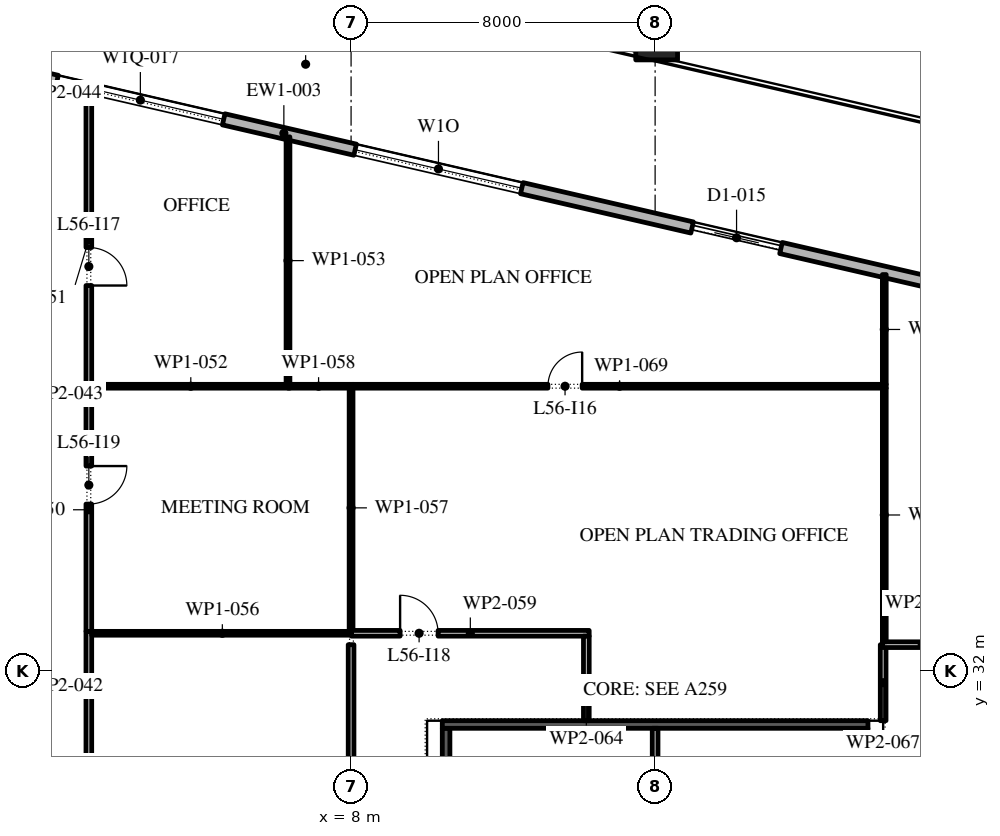
"""IFC4 building model, lengths in metres.
Left out: names, types, materials, properties, quantities, classifications, styles, units other than length and angle.
Written with IfcOpenShell. Run it as: python <this file> out.ifc"""

import sys

from ifc_helpers import new_model, si_unit, direction, frame, frame_2d, origin, origin_2d, place, context, subcontext, project, spatial, rectangle, extrude, element, fill, save


model = new_model("IFC4")
c1 = context("Model", 3, precision=1e-05, world=origin(), true_north=direction((0.0, 1.0)))
c2 = subcontext(c1, "Body", "Model", "MODEL_VIEW")
j1 = project(units=[si_unit("LENGTHUNIT", "METRE"), si_unit("PLANEANGLEUNIT", "RADIAN")], contexts=[c1])
p1 = place(None, origin())
s1 = spatial("IfcSite", under=j1, at=p1, CompositionType="ELEMENT")
p2 = place(p1, origin())
s2 = spatial("IfcBuilding", under=s1, at=p2, CompositionType="ELEMENT")
p3 = place(p2, frame((0.0, 0.0, 259.8)))
s3 = spatial("IfcBuildingStorey", under=s2, at=p3, CompositionType="ELEMENT", Elevation=259.8)
p4 = place(p3, frame((16.04, 48.637, 0.0), z_axis=(0.020377493232, 0.0882252832, 0.995892091129), x_axis=(-0.97434807649, 0.225046274885, 0.0)))
e1 = element("IfcColumn", 1, at=p4, inside=s3, PredefinedType="COLUMN", context=c2, shape_type="SweptSolid", body=[
    extrude(rectangle(XDim=1.1, YDim=1.1, at=origin_2d()), origin(), (0.0, 0.0, 1.0), 4.217),
])
p5 = place(p3, frame((21.359, -11.678, 0.0), z_axis=(0.0, 0.0, 1.0), x_axis=(0.224949198343, 0.974370493275, 0.0)))
e2 = element("IfcWall", 2, at=p5, inside=s3, PredefinedType="STANDARD", context=c2, shape_type="SweptSolid", body=[
    extrude(rectangle(XDim=49.5, YDim=0.3, at=frame_2d((24.75, 0.0))), origin(), (0.0, 0.0, 1.0), 4.0),
])
p6 = place(p5, frame((1.157, 0.0, 0.45)))
e3 = element("IfcOpeningElement", 3, at=p6, cuts=e2, PredefinedType="OPENING", context=c2, shape_type="SweptSolid", body=[
    extrude(rectangle(XDim=4.5, YDim=3.05, at=frame_2d((2.25, 1.525))), frame((0.0, 0.16, 0.0), z_axis=(0.0, -1.0, 0.0), x_axis=(1.0, 0.0, 0.0)), (0.0, 0.0, 1.0), 0.32),
])
p7 = place(p5, frame((8.121, 0.0, 0.45)))
e4 = element("IfcOpeningElement", 4, at=p7, cuts=e2, PredefinedType="OPENING", context=c2, shape_type="SweptSolid", body=[
    extrude(rectangle(XDim=4.5, YDim=3.05, at=frame_2d((2.25, 1.525))), frame((0.0, 0.16, 0.0), z_axis=(0.0, -1.0, 0.0), x_axis=(1.0, 0.0, 0.0)), (0.0, 0.0, 1.0), 0.32),
])
p8 = place(p5, frame((15.236, 0.0, 0.45)))
e5 = element("IfcOpeningElement", 5, at=p8, cuts=e2, PredefinedType="OPENING", context=c2, shape_type="SweptSolid", body=[
    extrude(rectangle(XDim=4.5, YDim=3.05, at=frame_2d((2.25, 1.525))), frame((0.0, 0.16, 0.0), z_axis=(0.0, -1.0, 0.0), x_axis=(1.0, 0.0, 0.0)), (0.0, 0.0, 1.0), 0.32),
])
p9 = place(p5, frame((22.35, 0.0, 0.45)))
e6 = element("IfcOpeningElement", 6, at=p9, cuts=e2, PredefinedType="OPENING", context=c2, shape_type="SweptSolid", body=[
    extrude(rectangle(XDim=4.5, YDim=3.05, at=frame_2d((2.25, 1.525))), frame((0.0, 0.16, 0.0), z_axis=(0.0, -1.0, 0.0), x_axis=(1.0, 0.0, 0.0)), (0.0, 0.0, 1.0), 0.32),
])
p10 = place(p5, frame((29.464, 0.0, 0.45)))
e7 = element("IfcOpeningElement", 7, at=p10, cuts=e2, PredefinedType="OPENING", context=c2, shape_type="SweptSolid", body=[
    extrude(rectangle(XDim=4.5, YDim=2.95, at=frame_2d((2.25, 1.475))), frame((0.0, 0.16, 0.0), z_axis=(0.0, -1.0, 0.0), x_axis=(1.0, 0.0, 0.0)), (0.0, 0.0, 1.0), 0.32),
])
p11 = place(p5, frame((37.628, 0.0, 0.0)))
e8 = element("IfcOpeningElement", 8, at=p11, cuts=e2, PredefinedType="OPENING", context=c2, shape_type="SweptSolid", body=[
    extrude(rectangle(XDim=2.4, YDim=3.325, at=frame_2d((1.2, 1.663))), frame((0.0, 0.16, 0.0), z_axis=(0.0, -1.0, 0.0), x_axis=(1.0, 0.0, 0.0)), (0.0, 0.0, 1.0), 0.32),
])
p12 = place(p5, frame((43.693, 0.0, 0.45)))
e9 = element("IfcOpeningElement", 9, at=p12, cuts=e2, PredefinedType="OPENING", context=c2, shape_type="SweptSolid", body=[
    extrude(rectangle(XDim=4.5, YDim=3.05, at=frame_2d((2.25, 1.525))), frame((0.0, 0.16, 0.0), z_axis=(0.0, -1.0, 0.0), x_axis=(1.0, 0.0, 0.0)), (0.0, 0.0, 1.0), 0.32),
])
p13 = place(p3, frame((29.616, 40.758, 0.0), z_axis=(0.0, 0.0, 1.0), x_axis=(-0.974370532314, 0.224949029246, 0.0)))
e10 = element("IfcWall", 10, at=p13, inside=s3, PredefinedType="STANDARD", context=c2, shape_type="SweptSolid", body=[
    extrude(rectangle(XDim=48.0, YDim=0.3, at=frame_2d((24.0, 0.0))), origin(), (0.0, 0.0, 1.0), 4.0),
])
p14 = place(p13, frame((1.625, 0.0, 0.45)))
e11 = element("IfcOpeningElement", 11, at=p14, cuts=e10, PredefinedType="OPENING", context=c2, shape_type="SweptSolid", body=[
    extrude(rectangle(XDim=4.5, YDim=2.65, at=frame_2d((2.25, 1.325))), frame((0.0, 0.16, 0.0), z_axis=(0.0, -1.0, 0.0), x_axis=(1.0, 0.0, 0.0)), (0.0, 0.0, 1.0), 0.32),
])
p15 = place(p13, frame((10.575, 0.0, 0.0)))
e12 = element("IfcOpeningElement", 12, at=p15, cuts=e10, PredefinedType="OPENING", context=c2, shape_type="SweptSolid", body=[
    extrude(rectangle(XDim=2.4, YDim=3.5, at=frame_2d((1.2, 1.75))), frame((0.0, 0.16, 0.0), z_axis=(0.0, -1.0, 0.0), x_axis=(1.0, 0.0, 0.0)), (0.0, 0.0, 1.0), 0.32),
])
p16 = place(p13, frame((17.575, 0.0, 0.45)))
e13 = element("IfcOpeningElement", 13, at=p16, cuts=e10, PredefinedType="OPENING", context=c2, shape_type="SweptSolid", body=[
    extrude(rectangle(XDim=4.5, YDim=2.5, at=frame_2d((2.25, 1.25))), frame((0.0, 0.16, 0.0), z_axis=(0.0, -1.0, 0.0), x_axis=(1.0, 0.0, 0.0)), (0.0, 0.0, 1.0), 0.32),
])
p17 = place(p13, frame((25.625, 0.0, 0.45)))
e14 = element("IfcOpeningElement", 14, at=p17, cuts=e10, PredefinedType="OPENING", context=c2, shape_type="SweptSolid", body=[
    extrude(rectangle(XDim=4.5, YDim=2.45, at=frame_2d((2.25, 1.225))), frame((0.0, 0.16, 0.0), z_axis=(0.0, -1.0, 0.0), x_axis=(1.0, 0.0, 0.0)), (0.0, 0.0, 1.0), 0.32),
])
p18 = place(p13, frame((33.675, 0.0, 0.45)))
e15 = element("IfcOpeningElement", 15, at=p18, cuts=e10, PredefinedType="OPENING", context=c2, shape_type="SweptSolid", body=[
    extrude(rectangle(XDim=4.5, YDim=2.45, at=frame_2d((2.25, 1.225))), frame((0.0, 0.16, 0.0), z_axis=(0.0, -1.0, 0.0), x_axis=(1.0, 0.0, 0.0)), (0.0, 0.0, 1.0), 0.32),
])
p19 = place(p13, frame((42.775, 0.0, 0.0)))
e16 = element("IfcOpeningElement", 16, at=p19, cuts=e10, PredefinedType="OPENING", context=c2, shape_type="SweptSolid", body=[
    extrude(rectangle(XDim=2.4, YDim=3.5, at=frame_2d((1.2, 1.75))), frame((0.0, 0.16, 0.0), z_axis=(0.0, -1.0, 0.0), x_axis=(1.0, 0.0, 0.0)), (0.0, 0.0, 1.0), 0.32),
])
p20 = place(p3, frame((21.5, 25.75, 0.0), z_axis=(0.0, 0.0, 1.0), x_axis=(0.0, 1.0, 0.0)))
e17 = element("IfcWall", 17, at=p20, inside=s3, PredefinedType="SHEAR", context=c2, shape_type="SweptSolid", body=[
    extrude(rectangle(XDim=4.75, YDim=0.2, at=frame_2d((2.375, 0.0))), origin(), (0.0, 0.0, 1.0), 4.0),
])
p21 = place(p20, frame((1.925, 0.0, 0.0)))
e18 = element("IfcOpeningElement", 18, at=p21, cuts=e17, PredefinedType="OPENING", context=c2, shape_type="SweptSolid", body=[
    extrude(rectangle(XDim=0.9, YDim=2.1, at=frame_2d((0.45, 1.05))), frame((0.0, 0.11, 0.0), z_axis=(0.0, -1.0, 0.0), x_axis=(1.0, 0.0, 0.0)), (0.0, 0.0, 1.0), 0.22),
])
p22 = place(p3, frame((10.5, 25.75, 0.0), z_axis=(0.0, 0.0, 1.0), x_axis=(0.0, 1.0, 0.0)))
e19 = element("IfcWall", 19, at=p22, inside=s3, PredefinedType="SHEAR", context=c2, shape_type="SweptSolid", body=[
    extrude(rectangle(XDim=4.75, YDim=0.2, at=frame_2d((2.375, 0.0))), origin(), (0.0, 0.0, 1.0), 4.0),
])
p23 = place(p22, frame((1.925, 0.0, 0.0)))
e20 = element("IfcOpeningElement", 20, at=p23, cuts=e19, PredefinedType="OPENING", context=c2, shape_type="SweptSolid", body=[
    extrude(rectangle(XDim=0.9, YDim=2.1, at=frame_2d((0.45, 1.05))), frame((0.0, 0.11, 0.0), z_axis=(0.0, -1.0, 0.0), x_axis=(1.0, 0.0, 0.0)), (0.0, 0.0, 1.0), 0.22),
])
p24 = place(p3, frame((10.4, 30.6, 0.0), z_axis=(0.0, 0.0, 1.0), x_axis=(1.0, 0.0, 0.0)))
e21 = element("IfcWall", 21, at=p24, inside=s3, PredefinedType="SHEAR", context=c2, shape_type="SweptSolid", body=[
    extrude(rectangle(XDim=11.2, YDim=0.2, at=frame_2d((5.6, 0.0))), origin(), (0.0, 0.0, 1.0), 4.0),
])
p25 = place(p3, frame((16.0, 25.75, 0.0), z_axis=(0.0, 0.0, 1.0), x_axis=(0.0, 1.0, 0.0)))
e22 = element("IfcWall", 22, at=p25, inside=s3, PredefinedType="PARTITIONING", context=c2, shape_type="SweptSolid", body=[
    extrude(rectangle(XDim=4.75, YDim=0.15, at=frame_2d((2.375, 0.0))), origin(), (0.0, 0.0, 1.0), 4.0),
])
p26 = place(p3, frame((1.1, 33.05, 0.0), z_axis=(0.0, 0.0, 1.0), x_axis=(0.0, -1.0, 0.0)))
e23 = element("IfcWall", 23, at=p26, inside=s3, PredefinedType="PARTITIONING", context=c2, shape_type="SweptSolid", body=[
    extrude(rectangle(XDim=9.05, YDim=0.15, at=frame_2d((4.525, 0.0))), origin(), (0.0, 0.0, 1.0), 4.0),
])
p27 = place(p26, frame((4.15, 0.0, 0.0)))
e24 = element("IfcOpeningElement", 24, at=p27, cuts=e23, PredefinedType="OPENING", context=c2, shape_type="SweptSolid", body=[
    extrude(rectangle(XDim=1.0, YDim=2.1, at=frame_2d((0.5, 1.05))), frame((0.0, 0.085, 0.0), z_axis=(0.0, -1.0, 0.0), x_axis=(1.0, 0.0, 0.0)), (0.0, 0.0, 1.0), 0.17),
])
p28 = place(p3, frame((1.1, 39.45, 0.0), z_axis=(0.0, 0.0, 1.0), x_axis=(0.0, -1.0, 0.0)))
e25 = element("IfcWall", 25, at=p28, inside=s3, PredefinedType="PARTITIONING", context=c2, shape_type="SweptSolid", body=[
    extrude(rectangle(XDim=6.4, YDim=0.15, at=frame_2d((3.2, 0.0))), origin(), (0.0, 0.0, 1.0), 4.0),
])
p29 = place(p28, frame((2.05, 0.0, 0.0)))
e26 = element("IfcOpeningElement", 26, at=p29, cuts=e25, PredefinedType="OPENING", context=c2, shape_type="SweptSolid", body=[
    extrude(rectangle(XDim=1.0, YDim=2.1, at=frame_2d((0.5, 1.05))), frame((0.0, 0.085, 0.0), z_axis=(0.0, -1.0, 0.0), x_axis=(1.0, 0.0, 0.0)), (0.0, 0.0, 1.0), 0.17),
])
p30 = place(p3, frame((1.1, 47.27, 0.0), z_axis=(0.0, 0.0, 1.0), x_axis=(0.0, -1.0, 0.0)))
e27 = element("IfcWall", 27, at=p30, inside=s3, PredefinedType="PARTITIONING", context=c2, shape_type="SweptSolid", body=[
    extrude(rectangle(XDim=7.82, YDim=0.15, at=frame_2d((3.91, 0.0))), origin(), (0.0, 0.0, 1.0), 4.0),
])
p31 = place(p30, frame((4.12, 0.0, 0.0)))
e28 = element("IfcOpeningElement", 28, at=p31, cuts=e27, PredefinedType="OPENING", context=c2, shape_type="SweptSolid", body=[
    extrude(rectangle(XDim=1.0, YDim=2.1, at=frame_2d((0.5, 1.05))), frame((0.0, 0.085, 0.0), z_axis=(0.0, -1.0, 0.0), x_axis=(1.0, 0.0, 0.0)), (0.0, 0.0, 1.0), 0.17),
])
p32 = place(p3, frame((6.39, 39.5, 0.0), z_axis=(0.0, 0.0, 1.0), x_axis=(-1.0, 0.0, 0.0)))
e29 = element("IfcWall", 29, at=p32, inside=s3, PredefinedType="PARTITIONING", context=c2, shape_type="SweptSolid", body=[
    extrude(rectangle(XDim=5.215, YDim=0.1, at=frame_2d((2.607, 0.0))), origin(), (0.0, 0.0, 1.0), 4.0),
])
p33 = place(p3, frame((6.34, 39.55, 0.0), z_axis=(0.0, 0.0, 1.0), x_axis=(0.0, 1.0, 0.0)))
e30 = element("IfcWall", 30, at=p33, inside=s3, PredefinedType="PARTITIONING", context=c2, shape_type="SweptSolid", body=[
    extrude(rectangle(XDim=6.511, YDim=0.1, at=frame_2d((3.255, 0.0))), origin(), (0.0, 0.0, 1.0), 4.0),
])
p34 = place(p3, frame((8.0, 24.05, 0.0), z_axis=(0.0, 0.0, 1.0), x_axis=(0.0, 1.0, 0.0)))
e31 = element("IfcWall", 31, at=p34, inside=s3, PredefinedType="PARTITIONING", context=c2, shape_type="SweptSolid", body=[
    extrude(rectangle(XDim=8.65, YDim=0.15, at=frame_2d((4.325, 0.0))), origin(), (0.0, 0.0, 1.0), 4.0),
])
p35 = place(p3, frame((8.05, 33.0, 0.0), z_axis=(0.0, 0.0, 1.0), x_axis=(-1.0, 0.0, 0.0)))
e32 = element("IfcWall", 32, at=p35, inside=s3, PredefinedType="PARTITIONING", context=c2, shape_type="SweptSolid", body=[
    extrude(rectangle(XDim=6.875, YDim=0.1, at=frame_2d((3.438, 0.0))), origin(), (0.0, 0.0, 1.0), 4.0),
])
p36 = place(p3, frame((8.0, 33.05, 0.0), z_axis=(0.0, 0.0, 1.0), x_axis=(0.0, 1.0, 0.0)))
e33 = element("IfcWall", 33, at=p36, inside=s3, PredefinedType="PARTITIONING", context=c2, shape_type="SweptSolid", body=[
    extrude(rectangle(XDim=6.5, YDim=0.1, at=frame_2d((3.25, 0.0))), origin(), (0.0, 0.0, 1.0), 4.0),
])
p37 = place(p3, frame((7.95, 39.5, 0.0), z_axis=(0.0, 0.0, 1.0), x_axis=(-1.0, 0.0, 0.0)))
e34 = element("IfcWall", 34, at=p37, inside=s3, PredefinedType="PARTITIONING", context=c2, shape_type="SweptSolid", body=[
    extrude(rectangle(XDim=1.61, YDim=0.1, at=frame_2d((0.805, 0.0))), origin(), (0.0, 0.0, 1.0), 4.0),
])
p38 = place(p3, frame((8.01, 33.0, 0.0), z_axis=(0.0, 0.0, 1.0), x_axis=(1.0, 0.0, 0.0)))
e35 = element("IfcWall", 35, at=p38, inside=s3, PredefinedType="PARTITIONING", context=c2, shape_type="SweptSolid", body=[
    extrude(rectangle(XDim=6.255, YDim=0.15, at=frame_2d((3.127, 0.0))), origin(), (0.0, 0.0, 1.0), 4.0),
])
p39 = place(p38, frame((1.28, 0.0, 0.0)))
e36 = element("IfcOpeningElement", 36, at=p39, cuts=e35, PredefinedType="OPENING", context=c2, shape_type="SweptSolid", body=[
    extrude(rectangle(XDim=1.0, YDim=2.1, at=frame_2d((0.5, 1.05))), frame((0.0, 0.085, 0.0), z_axis=(0.0, -1.0, 0.0), x_axis=(1.0, 0.0, 0.0)), (0.0, 0.0, 1.0), 0.17),
])
p40 = place(p3, frame((14.19, 32.925, 0.0), z_axis=(0.0, 0.0, 1.0), x_axis=(0.0, -1.0, 0.0)))
e37 = element("IfcWall", 37, at=p40, inside=s3, PredefinedType="PARTITIONING", context=c2, shape_type="SweptSolid", body=[
    extrude(rectangle(XDim=2.225, YDim=0.15, at=frame_2d((1.113, 0.0))), origin(), (0.0, 0.0, 1.0), 4.0),
])
p41 = place(p3, frame((22.0, 30.7, 0.0), z_axis=(0.0, 0.0, 1.0), x_axis=(0.0, 1.0, 0.0)))
e38 = element("IfcWall", 38, at=p41, inside=s3, PredefinedType="PARTITIONING", context=c2, shape_type="SweptSolid", body=[
    extrude(rectangle(XDim=2.0, YDim=0.15, at=frame_2d((1.0, 0.0))), origin(), (0.0, 0.0, 1.0), 4.0),
])
p42 = place(p3, frame((21.98, 32.7, 0.0), z_axis=(0.0, 0.0, 1.0), x_axis=(1.0, 0.0, 0.0)))
e39 = element("IfcWall", 39, at=p42, inside=s3, PredefinedType="PARTITIONING", context=c2, shape_type="SweptSolid", body=[
    extrude(rectangle(XDim=2.095, YDim=0.15, at=frame_2d((1.047, 0.0))), origin(), (0.0, 0.0, 1.0), 4.0),
])
p43 = place(p3, frame((22.08, 39.5, 0.0), z_axis=(0.0, 0.0, 1.0), x_axis=(-1.0, 0.0, 0.0)))
e40 = element("IfcWall", 40, at=p43, inside=s3, PredefinedType="PARTITIONING", context=c2, shape_type="SweptSolid", body=[
    extrude(rectangle(XDim=14.03, YDim=0.1, at=frame_2d((7.015, 0.0))), origin(), (0.0, 0.0, 1.0), 4.0),
])
p44 = place(p43, frame((8.0, 0.0, 0.0)))
e41 = element("IfcOpeningElement", 41, at=p44, cuts=e40, PredefinedType="OPENING", context=c2, shape_type="SweptSolid", body=[
    extrude(rectangle(XDim=0.9, YDim=2.1, at=frame_2d((0.45, 1.05))), frame((0.0, 0.06, 0.0), z_axis=(0.0, -1.0, 0.0), x_axis=(1.0, 0.0, 0.0)), (0.0, 0.0, 1.0), 0.12),
])
p45 = place(p3, frame((22.03, 39.45, 0.0), z_axis=(0.0, 0.0, 1.0), x_axis=(0.0, -1.0, 0.0)))
e42 = element("IfcWall", 42, at=p45, inside=s3, PredefinedType="PARTITIONING", context=c2, shape_type="SweptSolid", body=[
    extrude(rectangle(XDim=6.675, YDim=0.1, at=frame_2d((3.337, 0.0))), origin(), (0.0, 0.0, 1.0), 4.0),
])
p46 = place(p3, frame((22.03, 42.438, 0.0), z_axis=(0.0, 0.0, 1.0), x_axis=(0.0, -1.0, 0.0)))
e43 = element("IfcWall", 43, at=p46, inside=s3, PredefinedType="PARTITIONING", context=c2, shape_type="SweptSolid", body=[
    extrude(rectangle(XDim=2.888, YDim=0.1, at=frame_2d((1.444, 0.0))), origin(), (0.0, 0.0, 1.0), 4.0),
])
p47 = place(p15, origin())
e44 = element("IfcDoor", 44, at=p47, inside=s3, OperationType="DOUBLE_DOOR_SLIDING", PredefinedType="DOOR", context=c2, shape_type="SweptSolid", body=[
    extrude(rectangle(XDim=2.4, YDim=3.5, at=frame_2d((1.2, 1.75))), frame((0.0, 0.025, 0.0), z_axis=(0.0, -1.0, 0.0), x_axis=(1.0, 0.0, 0.0)), (0.0, 0.0, 1.0), 0.05),
])
fill(e12, e44)
p48 = place(p16, origin())
e45 = element("IfcWindow", 45, at=p48, inside=s3, PartitioningType="DOUBLE_PANEL_VERTICAL", PredefinedType="WINDOW", context=c2, shape_type="SweptSolid", body=[
    extrude(rectangle(XDim=4.5, YDim=2.5, at=frame_2d((2.25, 1.25))), frame((0.0, 0.03, 0.0), z_axis=(0.0, -1.0, 0.0), x_axis=(1.0, 0.0, 0.0)), (0.0, 0.0, 1.0), 0.06),
])
fill(e13, e45)
p49 = place(p17, origin())
e46 = element("IfcWindow", 46, at=p49, inside=s3, PartitioningType="DOUBLE_PANEL_VERTICAL", PredefinedType="WINDOW", context=c2, shape_type="SweptSolid", body=[
    extrude(rectangle(XDim=4.5, YDim=2.45, at=frame_2d((2.25, 1.225))), frame((0.0, 0.03, 0.0), z_axis=(0.0, -1.0, 0.0), x_axis=(1.0, 0.0, 0.0)), (0.0, 0.0, 1.0), 0.06),
])
fill(e14, e46)
p50 = place(p44, frame((0.9, 0.0, 0.0), z_axis=(0.0, 0.0, 1.0), x_axis=(-1.0, 0.0, 0.0)))
e47 = element("IfcDoor", 47, at=p50, inside=s3, OperationType="SINGLE_SWING_LEFT", PredefinedType="DOOR", context=c2, shape_type="SweptSolid", body=[
    extrude(rectangle(XDim=0.9, YDim=2.1, at=frame_2d((0.45, 1.05))), frame((0.0, 0.025, 0.0), z_axis=(0.0, -1.0, 0.0), x_axis=(1.0, 0.0, 0.0)), (0.0, 0.0, 1.0), 0.05),
])
fill(e41, e47)
p51 = place(p31, origin())
e48 = element("IfcDoor", 48, at=p51, inside=s3, OperationType="SINGLE_SWING_LEFT", PredefinedType="DOOR", context=c2, shape_type="SweptSolid", body=[
    extrude(rectangle(XDim=1.0, YDim=2.1, at=frame_2d((0.5, 1.05))), frame((0.0, 0.025, 0.0), z_axis=(0.0, -1.0, 0.0), x_axis=(1.0, 0.0, 0.0)), (0.0, 0.0, 1.0), 0.05),
])
fill(e28, e48)
p52 = place(p39, origin())
e49 = element("IfcDoor", 49, at=p52, inside=s3, OperationType="SINGLE_SWING_RIGHT", PredefinedType="DOOR", context=c2, shape_type="SweptSolid", body=[
    extrude(rectangle(XDim=1.0, YDim=2.1, at=frame_2d((0.5, 1.05))), frame((0.0, 0.025, 0.0), z_axis=(0.0, -1.0, 0.0), x_axis=(1.0, 0.0, 0.0)), (0.0, 0.0, 1.0), 0.05),
])
fill(e36, e49)
p53 = place(p29, origin())
e50 = element("IfcDoor", 50, at=p53, inside=s3, OperationType="SINGLE_SWING_RIGHT", PredefinedType="DOOR", context=c2, shape_type="SweptSolid", body=[
    extrude(rectangle(XDim=1.0, YDim=2.1, at=frame_2d((0.5, 1.05))), frame((0.0, 0.025, 0.0), z_axis=(0.0, -1.0, 0.0), x_axis=(1.0, 0.0, 0.0)), (0.0, 0.0, 1.0), 0.05),
])
fill(e26, e50)
save(model, sys.argv[1])
